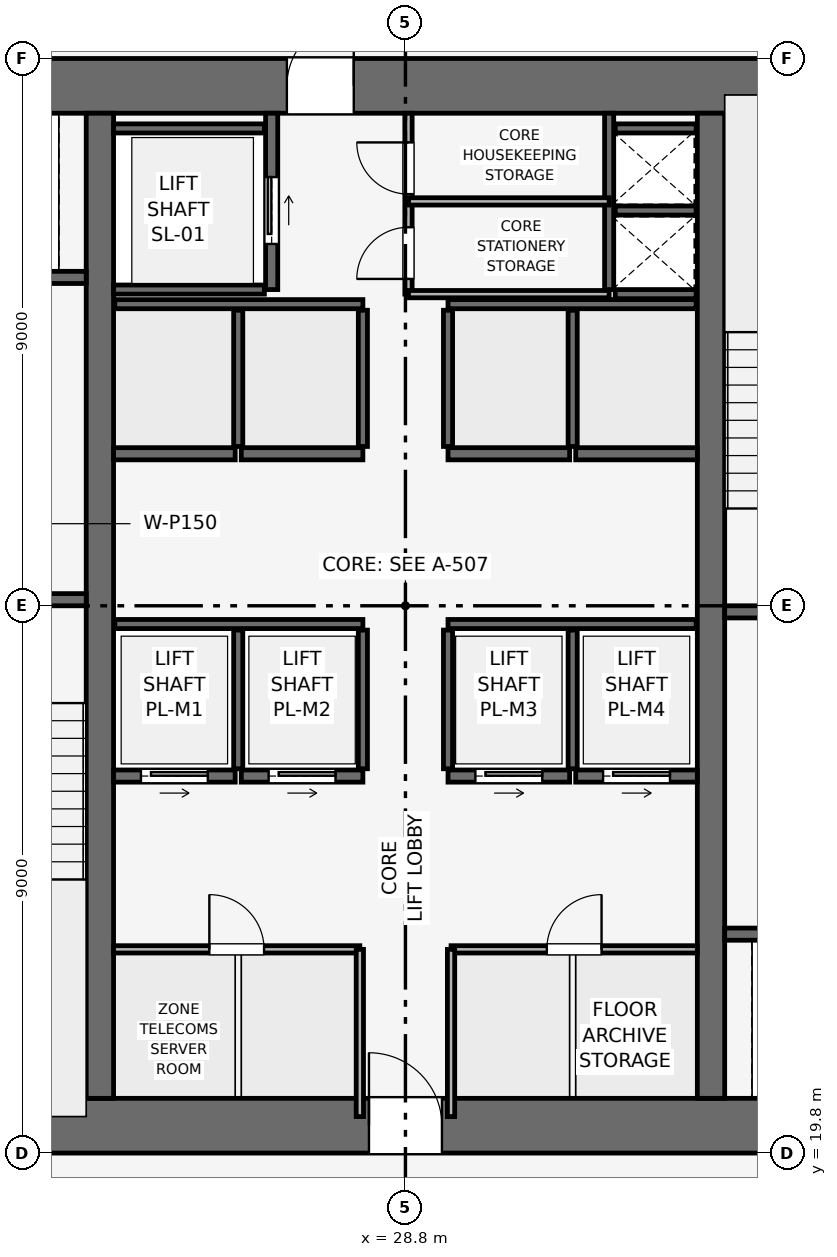
"""IFC4 building model, lengths in metres.
Left out: names, types, materials, properties, quantities, classifications, styles, units other than length and angle.
Written with IfcOpenShell. Run it as: python <this file> out.ifc"""

import sys

from ifc_helpers import new_model, si_unit, direction, frame, frame_2d, origin, place, context, subcontext, project, spatial, rectangle, extrude, element, fill, save


model = new_model("IFC4")
c1 = context("Model", 3, precision=1e-05, world=origin(), true_north=direction((0.0, 1.0)))
c2 = subcontext(c1, "Body", "Model", "MODEL_VIEW")
j1 = project(units=[si_unit("LENGTHUNIT", "METRE"), si_unit("PLANEANGLEUNIT", "RADIAN")], contexts=[c1])
p1 = place(None, origin())
s1 = spatial("IfcSite", under=j1, at=p1, CompositionType="ELEMENT")
p2 = place(p1, origin())
s2 = spatial("IfcBuilding", under=s1, at=p2, CompositionType="ELEMENT")
p3 = place(p2, frame((0.0, 0.0, 142.05)))
s3 = spatial("IfcBuildingStorey", under=s2, at=p3, CompositionType="ELEMENT", Elevation=142.05)
p4 = place(p3, frame((19.8, 20.25, 0.0), z_axis=(0.0, 0.0, 1.0), x_axis=(1.0, 0.0, 0.0)))
e1 = element("IfcWall", 1, at=p4, inside=s3, PredefinedType="SHEAR", context=c2, shape_type="SweptSolid", body=[
    extrude(rectangle(XDim=18.0, YDim=0.9, at=frame_2d((9.0, 0.0))), origin(), (0.0, 0.0, 1.0), 3.75),
])
p5 = place(p4, frame((8.4, 0.0, 0.0)))
e2 = element("IfcOpeningElement", 2, at=p5, cuts=e1, PredefinedType="OPENING", context=c2, shape_type="SweptSolid", body=[
    extrude(rectangle(XDim=1.2, YDim=2.2, at=frame_2d((0.6, 1.1))), frame((0.0, 0.46, 0.0), z_axis=(0.0, -1.0, 0.0), x_axis=(1.0, 0.0, 0.0)), (0.0, 0.0, 1.0), 0.92),
])
p6 = place(p3, frame((19.8, 37.35, 0.0), z_axis=(0.0, 0.0, 1.0), x_axis=(1.0, 0.0, 0.0)))
e3 = element("IfcWall", 3, at=p6, inside=s3, PredefinedType="SHEAR", context=c2, shape_type="SweptSolid", body=[
    extrude(rectangle(XDim=18.0, YDim=0.9, at=frame_2d((9.0, 0.0))), origin(), (0.0, 0.0, 1.0), 3.75),
])
p7 = place(p6, frame((7.05, 0.0, 0.0)))
e4 = element("IfcOpeningElement", 4, at=p7, cuts=e3, PredefinedType="OPENING", context=c2, shape_type="SweptSolid", body=[
    extrude(rectangle(XDim=1.1, YDim=2.15, at=frame_2d((0.55, 1.075))), frame((0.0, 0.46, 0.0), z_axis=(0.0, -1.0, 0.0), x_axis=(1.0, 0.0, 0.0)), (0.0, 0.0, 1.0), 0.92),
])
for number, where, z_axis, x_axis in (
    (5, (23.775, 20.7, 0.0), (0.0, 0.0, 1.0), (0.0, 1.0, 0.0)),
    (6, (33.825, 20.7, 0.0), (0.0, 0.0, 1.0), (0.0, 1.0, 0.0)),
):
    element("IfcWall", number, at=place(p3, frame(where, z_axis=z_axis, x_axis=x_axis)), inside=s3, PredefinedType="SHEAR", context=c2, shape_type="SweptSolid", body=[
        extrude(rectangle(XDim=16.2, YDim=0.45, at=frame_2d((8.1, 0.0))), origin(), (0.0, 0.0, 1.0), 3.75),
    ])
p8 = place(p3, frame((20.4, 28.9, 0.0), z_axis=(0.0, 0.0, 1.0), x_axis=(1.0, 0.0, 0.0)))
e7 = element("IfcWall", 7, at=p8, inside=s3, PredefinedType="SHEAR", context=c2, shape_type="SweptSolid", body=[
    extrude(rectangle(XDim=3.15, YDim=0.2, at=frame_2d((1.575, 0.0))), origin(), (0.0, 0.0, 1.0), 3.495),
])
p9 = place(p8, frame((0.8, 0.0, 0.0)))
e8 = element("IfcOpeningElement", 8, at=p9, cuts=e7, PredefinedType="OPENING", context=c2, shape_type="SweptSolid", body=[
    extrude(rectangle(XDim=1.0, YDim=2.1, at=frame_2d((0.5, 1.05))), frame((0.0, 0.11, 0.0), z_axis=(0.0, -1.0, 0.0), x_axis=(1.0, 0.0, 0.0)), (0.0, 0.0, 1.0), 0.22),
])
p10 = place(p3, frame((34.05, 28.7, 0.0), z_axis=(0.0, 0.0, 1.0), x_axis=(1.0, 0.0, 0.0)))
e9 = element("IfcWall", 9, at=p10, inside=s3, PredefinedType="SHEAR", context=c2, shape_type="SweptSolid", body=[
    extrude(rectangle(XDim=3.15, YDim=0.2, at=frame_2d((1.575, 0.0))), origin(), (0.0, 0.0, 1.0), 3.495),
])
p11 = place(p10, frame((0.8, 0.0, 0.0)))
e10 = element("IfcOpeningElement", 10, at=p11, cuts=e9, PredefinedType="OPENING", context=c2, shape_type="SweptSolid", body=[
    extrude(rectangle(XDim=1.0, YDim=2.1, at=frame_2d((0.5, 1.05))), frame((0.0, 0.11, 0.0), z_axis=(0.0, -1.0, 0.0), x_axis=(1.0, 0.0, 0.0)), (0.0, 0.0, 1.0), 0.22),
])
p12 = place(p3, frame((32.15, 34.0, 0.0), z_axis=(0.0, 0.0, 1.0), x_axis=(0.0, 1.0, 0.0)))
e11 = element("IfcWall", 11, at=p12, inside=s3, PredefinedType="SHEAR", context=c2, shape_type="SweptSolid", body=[
    extrude(rectangle(XDim=2.9, YDim=0.15, at=frame_2d((1.45, 0.0))), origin(), (0.0, 0.0, 1.0), 3.495),
])
for number, where, z_axis, x_axis in (
    (12, (32.25, 33.925, 0.0), (0.0, 0.0, 1.0), (1.0, 0.0, 0.0)),
    (13, (32.25, 35.3, 0.0), (0.0, 0.0, 1.0), (1.0, 0.0, 0.0)),
):
    element("IfcWall", number, at=place(p3, frame(where, z_axis=z_axis, x_axis=x_axis)), inside=s3, PredefinedType="SHEAR", context=c2, shape_type="SweptSolid", body=[
        extrude(rectangle(XDim=1.33, YDim=0.15, at=frame_2d((0.665, 0.0))), origin(), (0.0, 0.0, 1.0), 3.495),
    ])
p13 = place(p3, frame((20.5, 34.2, 0.0), z_axis=(0.0, 0.0, 1.0), x_axis=(1.0, 0.0, 0.0)))
e14 = element("IfcWall", 14, at=p13, inside=s3, PredefinedType="SHEAR", context=c2, shape_type="SweptSolid", body=[
    extrude(rectangle(XDim=3.05, YDim=0.2, at=frame_2d((1.525, 0.0))), origin(), (0.0, 0.0, 1.0), 3.495),
])
p14 = place(p13, frame((0.75, 0.0, 0.0)))
e15 = element("IfcOpeningElement", 15, at=p14, cuts=e14, PredefinedType="OPENING", context=c2, shape_type="SweptSolid", body=[
    extrude(rectangle(XDim=1.1, YDim=2.15, at=frame_2d((0.55, 1.075))), frame((0.0, 0.11, 0.0), z_axis=(0.0, -1.0, 0.0), x_axis=(1.0, 0.0, 0.0)), (0.0, 0.0, 1.0), 0.22),
])
p15 = place(p3, frame((34.05, 23.4, 0.0), z_axis=(0.0, 0.0, 1.0), x_axis=(1.0, 0.0, 0.0)))
e16 = element("IfcWall", 16, at=p15, inside=s3, PredefinedType="SHEAR", context=c2, shape_type="SweptSolid", body=[
    extrude(rectangle(XDim=3.05, YDim=0.2, at=frame_2d((1.525, 0.0))), origin(), (0.0, 0.0, 1.0), 3.495),
])
p16 = place(p15, frame((1.2, 0.0, 0.0)))
e17 = element("IfcOpeningElement", 17, at=p16, cuts=e16, PredefinedType="OPENING", context=c2, shape_type="SweptSolid", body=[
    extrude(rectangle(XDim=1.1, YDim=2.15, at=frame_2d((0.55, 1.075))), frame((0.0, 0.11, 0.0), z_axis=(0.0, -1.0, 0.0), x_axis=(1.0, 0.0, 0.0)), (0.0, 0.0, 1.0), 0.22),
])
p17 = place(p3, frame((26.6, 34.0, 0.0), z_axis=(0.0, 0.0, 1.0), x_axis=(0.0, 1.0, 0.0)))
e18 = element("IfcWall", 18, at=p17, inside=s3, PredefinedType="SHEAR", context=c2, shape_type="SweptSolid", body=[
    extrude(rectangle(XDim=2.9, YDim=0.2, at=frame_2d((1.45, 0.0))), origin(), (0.0, 0.0, 1.0), 3.495),
])
p18 = place(p17, frame((0.75, 0.0, 0.0)))
e19 = element("IfcOpeningElement", 19, at=p18, cuts=e18, PredefinedType="OPENING", context=c2, shape_type="SweptSolid", body=[
    extrude(rectangle(XDim=1.1, YDim=2.15, at=frame_2d((0.55, 1.075))), frame((0.0, 0.11, 0.0), z_axis=(0.0, -1.0, 0.0), x_axis=(1.0, 0.0, 0.0)), (0.0, 0.0, 1.0), 0.22),
])
for number, where, z_axis, x_axis in (
    (20, (24.0, 34.0, 0.0), (0.0, 0.0, 1.0), (1.0, 0.0, 0.0)),
    (21, (24.0, 36.65, 0.0), (0.0, 0.0, 1.0), (1.0, 0.0, 0.0)),
):
    element("IfcWall", number, at=place(p3, frame(where, z_axis=z_axis, x_axis=x_axis)), inside=s3, PredefinedType="SHEAR", context=c2, shape_type="SweptSolid", body=[
        extrude(rectangle(XDim=2.48, YDim=0.15, at=frame_2d((1.24, 0.0))), origin(), (0.0, 0.0, 1.0), 3.495),
    ])
p19 = place(p3, frame((24.0, 26.0, 0.0), z_axis=(0.0, 0.0, 1.0), x_axis=(1.0, 0.0, 0.0)))
e22 = element("IfcWall", 22, at=p19, inside=s3, PredefinedType="SHEAR", context=c2, shape_type="SweptSolid", body=[
    extrude(rectangle(XDim=2.0, YDim=0.2, at=frame_2d((1.0, 0.0))), origin(), (0.0, 0.0, 1.0), 3.495),
])
p20 = place(p19, frame((0.45, 0.0, 0.0)))
e23 = element("IfcOpeningElement", 23, at=p20, cuts=e22, PredefinedType="OPENING", context=c2, shape_type="SweptSolid", body=[
    extrude(rectangle(XDim=1.1, YDim=2.15, at=frame_2d((0.55, 1.075))), frame((0.0, 0.11, 0.0), z_axis=(0.0, -1.0, 0.0), x_axis=(1.0, 0.0, 0.0)), (0.0, 0.0, 1.0), 0.22),
])
p21 = place(p3, frame((26.1, 26.0, 0.0), z_axis=(0.0, 0.0, 1.0), x_axis=(1.0, 0.0, 0.0)))
e24 = element("IfcWall", 24, at=p21, inside=s3, PredefinedType="SHEAR", context=c2, shape_type="SweptSolid", body=[
    extrude(rectangle(XDim=2.0, YDim=0.2, at=frame_2d((1.0, 0.0))), origin(), (0.0, 0.0, 1.0), 3.495),
])
p22 = place(p21, frame((0.45, 0.0, 0.0)))
e25 = element("IfcOpeningElement", 25, at=p22, cuts=e24, PredefinedType="OPENING", context=c2, shape_type="SweptSolid", body=[
    extrude(rectangle(XDim=1.1, YDim=2.15, at=frame_2d((0.55, 1.075))), frame((0.0, 0.11, 0.0), z_axis=(0.0, -1.0, 0.0), x_axis=(1.0, 0.0, 0.0)), (0.0, 0.0, 1.0), 0.22),
])
p23 = place(p3, frame((29.5, 26.0, 0.0), z_axis=(0.0, 0.0, 1.0), x_axis=(1.0, 0.0, 0.0)))
e26 = element("IfcWall", 26, at=p23, inside=s3, PredefinedType="SHEAR", context=c2, shape_type="SweptSolid", body=[
    extrude(rectangle(XDim=2.0, YDim=0.2, at=frame_2d((1.0, 0.0))), origin(), (0.0, 0.0, 1.0), 3.495),
])
p24 = place(p23, frame((0.45, 0.0, 0.0)))
e27 = element("IfcOpeningElement", 27, at=p24, cuts=e26, PredefinedType="OPENING", context=c2, shape_type="SweptSolid", body=[
    extrude(rectangle(XDim=1.1, YDim=2.15, at=frame_2d((0.55, 1.075))), frame((0.0, 0.11, 0.0), z_axis=(0.0, -1.0, 0.0), x_axis=(1.0, 0.0, 0.0)), (0.0, 0.0, 1.0), 0.22),
])
p25 = place(p3, frame((31.6, 26.0, 0.0), z_axis=(0.0, 0.0, 1.0), x_axis=(1.0, 0.0, 0.0)))
e28 = element("IfcWall", 28, at=p25, inside=s3, PredefinedType="SHEAR", context=c2, shape_type="SweptSolid", body=[
    extrude(rectangle(XDim=2.0, YDim=0.2, at=frame_2d((1.0, 0.0))), origin(), (0.0, 0.0, 1.0), 3.495),
])
p26 = place(p25, frame((0.45, 0.0, 0.0)))
e29 = element("IfcOpeningElement", 29, at=p26, cuts=e28, PredefinedType="OPENING", context=c2, shape_type="SweptSolid", body=[
    extrude(rectangle(XDim=1.1, YDim=2.15, at=frame_2d((0.55, 1.075))), frame((0.0, 0.11, 0.0), z_axis=(0.0, -1.0, 0.0), x_axis=(1.0, 0.0, 0.0)), (0.0, 0.0, 1.0), 0.22),
])
for number, where, z_axis, x_axis in (
    (30, (24.0, 31.3, 0.0), (0.0, 0.0, 1.0), (1.0, 0.0, 0.0)),
    (31, (26.1, 31.3, 0.0), (0.0, 0.0, 1.0), (1.0, 0.0, 0.0)),
    (32, (29.5, 31.3, 0.0), (0.0, 0.0, 1.0), (1.0, 0.0, 0.0)),
    (33, (31.6, 31.3, 0.0), (0.0, 0.0, 1.0), (1.0, 0.0, 0.0)),
):
    element("IfcWall", number, at=place(p3, frame(where, z_axis=z_axis, x_axis=x_axis)), inside=s3, PredefinedType="SHEAR", context=c2, shape_type="SweptSolid", body=[
        extrude(rectangle(XDim=2.0, YDim=0.2, at=frame_2d((1.0, 0.0))), origin(), (0.0, 0.0, 1.0), 3.495),
    ])
p27 = place(p3, frame((32.25, 36.65, 0.0), z_axis=(0.0, 0.0, 1.0), x_axis=(1.0, 0.0, 0.0)))
e34 = element("IfcWall", 34, at=p27, inside=s3, PredefinedType="SHEAR", context=c2, shape_type="SweptSolid", body=[
    extrude(rectangle(XDim=1.33, YDim=0.15, at=frame_2d((0.665, 0.0))), origin(), (0.0, 0.0, 1.0), 3.495),
])
for number, where, z_axis, x_axis in (
    (35, (24.02, 28.5, 0.0), (0.0, 0.0, 1.0), (1.0, 0.0, 0.0)),
    (36, (29.5, 28.5, 0.0), (0.0, 0.0, 1.0), (1.0, 0.0, 0.0)),
):
    element("IfcWall", number, at=place(p3, frame(where, z_axis=z_axis, x_axis=x_axis)), inside=s3, PredefinedType="SHEAR", context=c2, shape_type="SweptSolid", body=[
        extrude(rectangle(XDim=4.08, YDim=0.15, at=frame_2d((2.04, 0.0))), origin(), (0.0, 0.0, 1.0), 3.495),
    ])
for number, where, z_axis, x_axis in (
    (37, (26.05, 26.12, 0.0), (0.0, 0.0, 1.0), (0.0, 1.0, 0.0)),
    (38, (28.1, 26.12, 0.0), (0.0, 0.0, 1.0), (0.0, 1.0, 0.0)),
    (39, (29.5, 26.12, 0.0), (0.0, 0.0, 1.0), (0.0, 1.0, 0.0)),
    (40, (31.55, 26.12, 0.0), (0.0, 0.0, 1.0), (0.0, 1.0, 0.0)),
):
    element("IfcWall", number, at=place(p3, frame(where, z_axis=z_axis, x_axis=x_axis)), inside=s3, PredefinedType="SHEAR", context=c2, shape_type="SweptSolid", body=[
        extrude(rectangle(XDim=2.28, YDim=0.15, at=frame_2d((1.14, 0.0))), origin(), (0.0, 0.0, 1.0), 3.495),
    ])
for number, where, z_axis, x_axis in (
    (41, (24.02, 33.76, 0.0), (0.0, 0.0, 1.0), (1.0, 0.0, 0.0)),
    (42, (29.5, 33.76, 0.0), (0.0, 0.0, 1.0), (1.0, 0.0, 0.0)),
):
    element("IfcWall", number, at=place(p3, frame(where, z_axis=z_axis, x_axis=x_axis)), inside=s3, PredefinedType="SHEAR", context=c2, shape_type="SweptSolid", body=[
        extrude(rectangle(XDim=4.08, YDim=0.15, at=frame_2d((2.04, 0.0))), origin(), (0.0, 0.0, 1.0), 3.495),
    ])
for number, where, z_axis, x_axis in (
    (43, (26.05, 31.42, 0.0), (0.0, 0.0, 1.0), (0.0, 1.0, 0.0)),
    (44, (28.1, 31.42, 0.0), (0.0, 0.0, 1.0), (0.0, 1.0, 0.0)),
    (45, (29.5, 31.42, 0.0), (0.0, 0.0, 1.0), (0.0, 1.0, 0.0)),
    (46, (31.55, 31.42, 0.0), (0.0, 0.0, 1.0), (0.0, 1.0, 0.0)),
):
    element("IfcWall", number, at=place(p3, frame(where, z_axis=z_axis, x_axis=x_axis)), inside=s3, PredefinedType="SHEAR", context=c2, shape_type="SweptSolid", body=[
        extrude(rectangle(XDim=2.24, YDim=0.15, at=frame_2d((1.12, 0.0))), origin(), (0.0, 0.0, 1.0), 3.495),
    ])
p28 = place(p3, frame((28.85, 33.925, 0.0), z_axis=(0.0, 0.0, 1.0), x_axis=(0.0, 1.0, 0.0)))
e47 = element("IfcWall", 47, at=p28, inside=s3, PredefinedType="PARTITIONING", context=c2, shape_type="SweptSolid", body=[
    extrude(rectangle(XDim=2.975, YDim=0.12, at=frame_2d((1.487, 0.0))), origin(), (0.0, 0.0, 1.0), 3.495),
])
p29 = place(p28, frame((0.25, 0.0, 0.0)))
e48 = element("IfcOpeningElement", 48, at=p29, cuts=e47, PredefinedType="OPENING", context=c2, shape_type="SweptSolid", body=[
    extrude(rectangle(XDim=0.85, YDim=2.1, at=frame_2d((0.425, 1.05))), frame((0.0, 0.07, 0.0), z_axis=(0.0, -1.0, 0.0), x_axis=(1.0, 0.0, 0.0)), (0.0, 0.0, 1.0), 0.14),
])
p30 = place(p28, frame((1.645, 0.0, 0.0)))
e49 = element("IfcOpeningElement", 49, at=p30, cuts=e47, PredefinedType="OPENING", context=c2, shape_type="SweptSolid", body=[
    extrude(rectangle(XDim=0.85, YDim=2.1, at=frame_2d((0.425, 1.05))), frame((0.0, 0.07, 0.0), z_axis=(0.0, -1.0, 0.0), x_axis=(1.0, 0.0, 0.0)), (0.0, 0.0, 1.0), 0.14),
])
for number, where, z_axis, x_axis in (
    (50, (28.85, 35.45, 0.0), (0.0, 0.0, 1.0), (1.0, 0.0, 0.0)),
    (51, (28.85, 33.925, 0.0), (0.0, 0.0, 1.0), (1.0, 0.0, 0.0)),
):
    element("IfcWall", number, at=place(p3, frame(where, z_axis=z_axis, x_axis=x_axis)), inside=s3, PredefinedType="PARTITIONING", context=c2, shape_type="SweptSolid", body=[
        extrude(rectangle(XDim=3.3, YDim=0.12, at=frame_2d((1.65, 0.0))), origin(), (0.0, 0.0, 1.0), 3.495),
    ])
p31 = place(p3, frame((24.0, 23.15, 0.0), z_axis=(0.0, 0.0, 1.0), x_axis=(1.0, 0.0, 0.0)))
e52 = element("IfcWall", 52, at=p31, inside=s3, PredefinedType="PARTITIONING", context=c2, shape_type="SweptSolid", body=[
    extrude(rectangle(XDim=4.05, YDim=0.12, at=frame_2d((2.025, 0.0))), origin(), (0.0, 0.0, 1.0), 3.495),
])
p32 = place(p31, frame((1.575, 0.0, 0.0)))
e53 = element("IfcOpeningElement", 53, at=p32, cuts=e52, PredefinedType="OPENING", context=c2, shape_type="SweptSolid", body=[
    extrude(rectangle(XDim=0.9, YDim=2.1, at=frame_2d((0.45, 1.05))), frame((0.0, 0.07, 0.0), z_axis=(0.0, -1.0, 0.0), x_axis=(1.0, 0.0, 0.0)), (0.0, 0.0, 1.0), 0.14),
])
p33 = place(p3, frame((28.05, 20.4, 0.0), z_axis=(0.0, 0.0, 1.0), x_axis=(0.0, 1.0, 0.0)))
e54 = element("IfcWall", 54, at=p33, inside=s3, PredefinedType="PARTITIONING", context=c2, shape_type="SweptSolid", body=[
    extrude(rectangle(XDim=2.75, YDim=0.12, at=frame_2d((1.375, 0.0))), origin(), (0.0, 0.0, 1.0), 3.495),
])
p34 = place(p3, frame((29.55, 23.15, 0.0), z_axis=(0.0, 0.0, 1.0), x_axis=(1.0, 0.0, 0.0)))
e55 = element("IfcWall", 55, at=p34, inside=s3, PredefinedType="PARTITIONING", context=c2, shape_type="SweptSolid", body=[
    extrude(rectangle(XDim=4.05, YDim=0.12, at=frame_2d((2.025, 0.0))), origin(), (0.0, 0.0, 1.0), 3.495),
])
p35 = place(p34, frame((1.575, 0.0, 0.0)))
e56 = element("IfcOpeningElement", 56, at=p35, cuts=e55, PredefinedType="OPENING", context=c2, shape_type="SweptSolid", body=[
    extrude(rectangle(XDim=0.9, YDim=2.1, at=frame_2d((0.45, 1.05))), frame((0.0, 0.07, 0.0), z_axis=(0.0, -1.0, 0.0), x_axis=(1.0, 0.0, 0.0)), (0.0, 0.0, 1.0), 0.14),
])
p36 = place(p3, frame((29.55, 20.4, 0.0), z_axis=(0.0, 0.0, 1.0), x_axis=(0.0, 1.0, 0.0)))
e57 = element("IfcWall", 57, at=p36, inside=s3, PredefinedType="PARTITIONING", context=c2, shape_type="SweptSolid", body=[
    extrude(rectangle(XDim=2.75, YDim=0.12, at=frame_2d((1.375, 0.0))), origin(), (0.0, 0.0, 1.0), 3.495),
])
p37 = place(p18, origin())
e58 = element("IfcDoor", 58, at=p37, inside=s3, OperationType="SLIDING_TO_RIGHT", PredefinedType="DOOR", context=c2, shape_type="SweptSolid", body=[
    extrude(rectangle(XDim=1.1, YDim=2.15, at=frame_2d((0.55, 1.075))), frame((0.0, 0.025, 0.0), z_axis=(0.0, -1.0, 0.0), x_axis=(1.0, 0.0, 0.0)), (0.0, 0.0, 1.0), 0.05),
])
fill(e19, e58)
p38 = place(p20, origin())
e59 = element("IfcDoor", 59, at=p38, inside=s3, OperationType="SLIDING_TO_RIGHT", PredefinedType="DOOR", context=c2, shape_type="SweptSolid", body=[
    extrude(rectangle(XDim=1.1, YDim=2.15, at=frame_2d((0.55, 1.075))), frame((0.0, 0.025, 0.0), z_axis=(0.0, -1.0, 0.0), x_axis=(1.0, 0.0, 0.0)), (0.0, 0.0, 1.0), 0.05),
])
fill(e23, e59)
p39 = place(p22, origin())
e60 = element("IfcDoor", 60, at=p39, inside=s3, OperationType="SLIDING_TO_RIGHT", PredefinedType="DOOR", context=c2, shape_type="SweptSolid", body=[
    extrude(rectangle(XDim=1.1, YDim=2.15, at=frame_2d((0.55, 1.075))), frame((0.0, 0.025, 0.0), z_axis=(0.0, -1.0, 0.0), x_axis=(1.0, 0.0, 0.0)), (0.0, 0.0, 1.0), 0.05),
])
fill(e25, e60)
p40 = place(p24, origin())
e61 = element("IfcDoor", 61, at=p40, inside=s3, OperationType="SLIDING_TO_RIGHT", PredefinedType="DOOR", context=c2, shape_type="SweptSolid", body=[
    extrude(rectangle(XDim=1.1, YDim=2.15, at=frame_2d((0.55, 1.075))), frame((0.0, 0.025, 0.0), z_axis=(0.0, -1.0, 0.0), x_axis=(1.0, 0.0, 0.0)), (0.0, 0.0, 1.0), 0.05),
])
fill(e27, e61)
p41 = place(p26, origin())
e62 = element("IfcDoor", 62, at=p41, inside=s3, OperationType="SLIDING_TO_RIGHT", PredefinedType="DOOR", context=c2, shape_type="SweptSolid", body=[
    extrude(rectangle(XDim=1.1, YDim=2.15, at=frame_2d((0.55, 1.075))), frame((0.0, 0.025, 0.0), z_axis=(0.0, -1.0, 0.0), x_axis=(1.0, 0.0, 0.0)), (0.0, 0.0, 1.0), 0.05),
])
fill(e29, e62)
p42 = place(p29, origin())
e63 = element("IfcDoor", 63, at=p42, inside=s3, OperationType="SINGLE_SWING_LEFT", PredefinedType="DOOR", context=c2, shape_type="SweptSolid", body=[
    extrude(rectangle(XDim=0.85, YDim=2.1, at=frame_2d((0.425, 1.05))), frame((0.0, 0.025, 0.0), z_axis=(0.0, -1.0, 0.0), x_axis=(1.0, 0.0, 0.0)), (0.0, 0.0, 1.0), 0.05),
])
fill(e48, e63)
p43 = place(p30, origin())
e64 = element("IfcDoor", 64, at=p43, inside=s3, OperationType="SINGLE_SWING_RIGHT", PredefinedType="DOOR", context=c2, shape_type="SweptSolid", body=[
    extrude(rectangle(XDim=0.85, YDim=2.1, at=frame_2d((0.425, 1.05))), frame((0.0, 0.025, 0.0), z_axis=(0.0, -1.0, 0.0), x_axis=(1.0, 0.0, 0.0)), (0.0, 0.0, 1.0), 0.05),
])
fill(e49, e64)
p44 = place(p32, origin())
e65 = element("IfcDoor", 65, at=p44, inside=s3, OperationType="SINGLE_SWING_LEFT", PredefinedType="DOOR", context=c2, shape_type="SweptSolid", body=[
    extrude(rectangle(XDim=0.9, YDim=2.1, at=frame_2d((0.45, 1.05))), frame((0.0, 0.025, 0.0), z_axis=(0.0, -1.0, 0.0), x_axis=(1.0, 0.0, 0.0)), (0.0, 0.0, 1.0), 0.05),
])
fill(e53, e65)
p45 = place(p35, origin())
e66 = element("IfcDoor", 66, at=p45, inside=s3, OperationType="SINGLE_SWING_RIGHT", PredefinedType="DOOR", context=c2, shape_type="SweptSolid", body=[
    extrude(rectangle(XDim=0.9, YDim=2.1, at=frame_2d((0.45, 1.05))), frame((0.0, 0.025, 0.0), z_axis=(0.0, -1.0, 0.0), x_axis=(1.0, 0.0, 0.0)), (0.0, 0.0, 1.0), 0.05),
])
fill(e56, e66)
p46 = place(p5, origin())
e67 = element("IfcDoor", 67, at=p46, inside=s3, OperationType="SINGLE_SWING_LEFT", PredefinedType="DOOR", context=c2, shape_type="SweptSolid", body=[
    extrude(rectangle(XDim=1.2, YDim=2.2, at=frame_2d((0.6, 1.1))), frame((0.0, 0.025, 0.0), z_axis=(0.0, -1.0, 0.0), x_axis=(1.0, 0.0, 0.0)), (0.0, 0.0, 1.0), 0.05),
])
fill(e2, e67)
p47 = place(p7, origin())
e68 = element("IfcDoor", 68, at=p47, inside=s3, OperationType="SINGLE_SWING_RIGHT", PredefinedType="DOOR", context=c2, shape_type="SweptSolid", body=[
    extrude(rectangle(XDim=1.1, YDim=2.15, at=frame_2d((0.55, 1.075))), frame((0.0, 0.025, 0.0), z_axis=(0.0, -1.0, 0.0), x_axis=(1.0, 0.0, 0.0)), (0.0, 0.0, 1.0), 0.05),
])
fill(e4, e68)
save(model, sys.argv[1])
